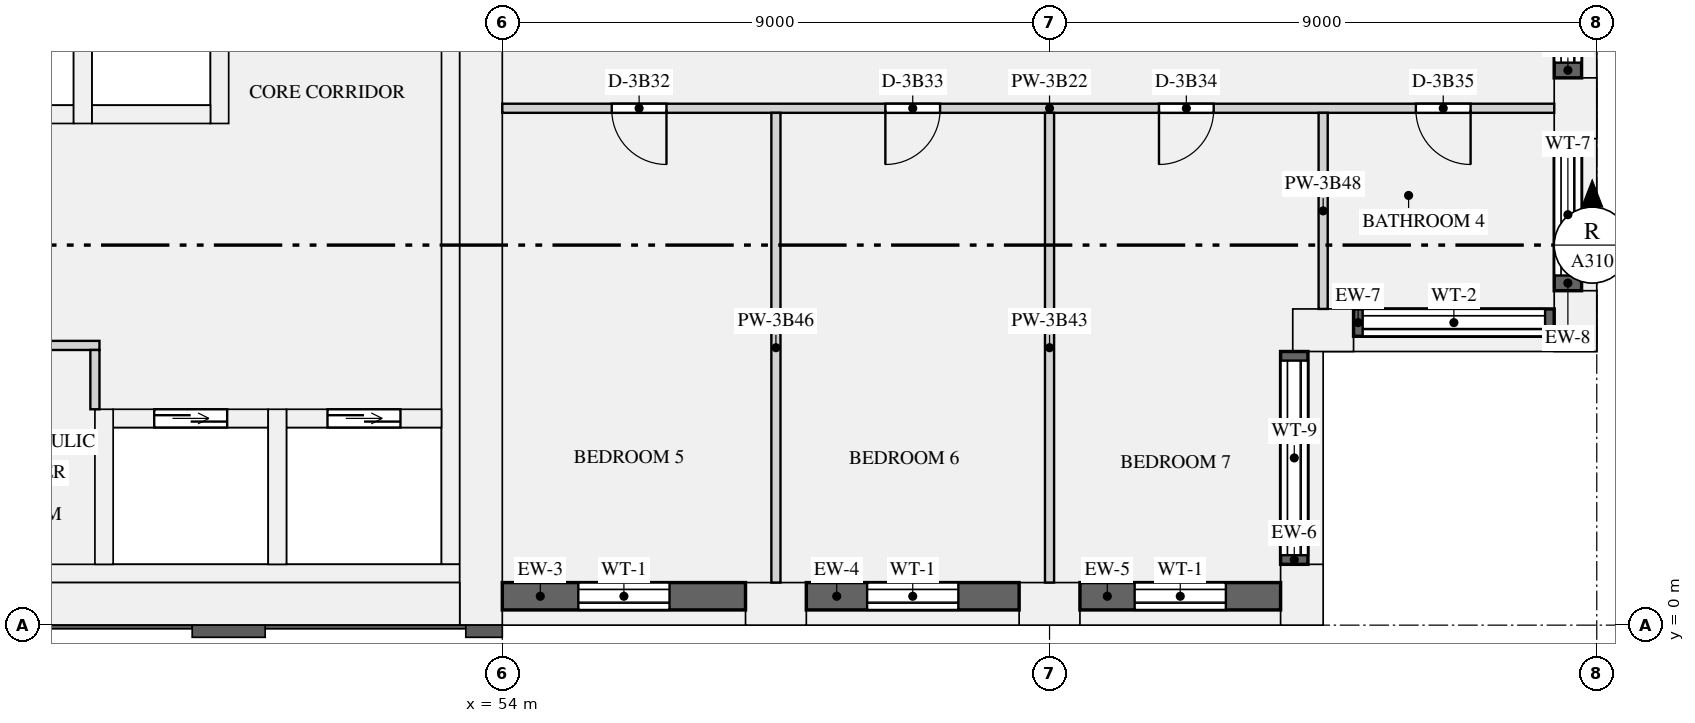
"""IFC4 building model, lengths in metres.
Left out: names, types, materials, properties, quantities, classifications, styles, units other than length and angle.
Written with IfcOpenShell. Run it as: python <this file> out.ifc"""

import sys

from ifc_helpers import new_model, si_unit, direction, frame, frame_2d, origin, origin_2d, place, context, subcontext, project, spatial, rectangle, extrude, element, fill, save


model = new_model("IFC4")
c1 = context("Model", 3, precision=1e-05, world=origin(), true_north=direction((0.0, 1.0)))
c2 = subcontext(c1, "Body", "Model", "MODEL_VIEW")
j1 = project(units=[si_unit("LENGTHUNIT", "METRE"), si_unit("PLANEANGLEUNIT", "RADIAN")], contexts=[c1])
p1 = place(None, origin())
s1 = spatial("IfcSite", under=j1, at=p1, CompositionType="ELEMENT")
p2 = place(p1, origin())
s2 = spatial("IfcBuilding", under=s1, at=p2, CompositionType="ELEMENT")
p3 = place(p2, frame((0.0, 0.0, 150.75)))
s3 = spatial("IfcBuildingStorey", under=s2, at=p3, CompositionType="ELEMENT", Elevation=150.75)
for number, where, z_axis, x_axis in (
    (1, (58.5, 0.35, 0.0), (0.0, 0.0, 1.0), (1.0, 0.0, 0.0)),
    (2, (63.0, 0.35, 0.0), (0.0, 0.0, 1.0), (1.0, 0.0, 0.0)),
    (3, (67.15, 0.5, 0.0), (0.0, 0.0, 1.0), (0.0, 1.0, 0.0)),
    (4, (67.5, 4.85, 0.0), (0.0, 0.0, 1.0), (1.0, 0.0, 0.0)),
    (5, (71.65, 5.0, 0.0), (0.0, 0.0, 1.0), (0.0, 1.0, 0.0)),
    (6, (71.65, 8.5, 0.0), (0.0, 0.0, 1.0), (0.0, 1.0, 0.0)),
):
    element("IfcColumn", number, at=place(p3, frame(where, z_axis=z_axis, x_axis=x_axis)), inside=s3, PredefinedType="USERDEFINED", context=c2, shape_type="SweptSolid", body=[
        extrude(rectangle(XDim=1.0, YDim=0.7, at=origin_2d()), origin(), (0.0, 0.0, 1.0), 3.15),
    ])
p4 = place(p3, frame((53.65, 0.0, 0.0), z_axis=(0.0, 0.0, 1.0), x_axis=(0.0, 1.0, 0.0)))
e7 = element("IfcWall", 7, at=p4, inside=s3, PredefinedType="SHEAR", context=c2, shape_type="SweptSolid", body=[
    extrude(rectangle(XDim=12.5, YDim=0.7, at=frame_2d((6.25, 0.0))), origin(), (0.0, 0.0, 1.0), 3.15),
])
p5 = place(p3, frame((18.7, 0.35, 0.0), z_axis=(0.0, 0.0, 1.0), x_axis=(1.0, 0.0, 0.0)))
e8 = element("IfcWall", 8, at=p5, inside=s3, PredefinedType="SHEAR", context=c2, shape_type="SweptSolid", body=[
    extrude(rectangle(XDim=34.6, YDim=0.7, at=frame_2d((17.3, 0.0))), origin(), (0.0, 0.0, 1.0), 3.15),
])
p6 = place(p3, frame((53.15, 1.0, 0.0), z_axis=(0.0, 0.0, 1.0), x_axis=(0.0, 1.0, 0.0)))
e9 = element("IfcWall", 9, at=p6, inside=s3, PredefinedType="SHEAR", context=c2, shape_type="SweptSolid", body=[
    extrude(rectangle(XDim=10.9, YDim=0.3, at=frame_2d((5.45, 0.0))), origin(), (0.0, 0.0, 1.0), 3.15),
])
p7 = place(p3, frame((18.7, 0.85, 0.0), z_axis=(0.0, 0.0, 1.0), x_axis=(1.0, 0.0, 0.0)))
e10 = element("IfcWall", 10, at=p7, inside=s3, PredefinedType="SHEAR", context=c2, shape_type="SweptSolid", body=[
    extrude(rectangle(XDim=34.6, YDim=0.3, at=frame_2d((17.3, 0.0))), origin(), (0.0, 0.0, 1.0), 3.15),
])
for number, where, z_axis, x_axis in (
    (11, (45.0, 8.4, 0.0), (0.0, 0.0, 1.0), (1.0, 0.0, 0.0)),
    (12, (47.25, 8.4, 0.0), (0.0, 0.0, 1.0), (1.0, 0.0, 0.0)),
):
    element("IfcWall", number, at=place(p3, frame(where, z_axis=z_axis, x_axis=x_axis)), inside=s3, PredefinedType="SHEAR", context=c2, shape_type="SweptSolid", body=[
        extrude(rectangle(XDim=1.95, YDim=0.3, at=frame_2d((0.975, 0.0))), origin(), (0.0, 0.0, 1.0), 3.15),
    ])
for number, where, z_axis, x_axis in (
    (13, (47.1, 8.25, 0.0), (0.0, 0.0, 1.0), (0.0, 1.0, 0.0)),
    (14, (49.35, 8.25, 0.0), (0.0, 0.0, 1.0), (0.0, 1.0, 0.0)),
):
    element("IfcWall", number, at=place(p3, frame(where, z_axis=z_axis, x_axis=x_axis)), inside=s3, PredefinedType="SHEAR", context=c2, shape_type="SweptSolid", body=[
        extrude(rectangle(XDim=3.65, YDim=0.3, at=frame_2d((1.825, 0.0))), origin(), (0.0, 0.0, 1.0), 3.15),
    ])
p8 = place(p3, frame((47.6, 3.4, 0.0), z_axis=(0.0, 0.0, 1.0), x_axis=(1.0, 0.0, 0.0)))
e15 = element("IfcWall", 15, at=p8, inside=s3, PredefinedType="SHEAR", context=c2, shape_type="SweptSolid", body=[
    extrude(rectangle(XDim=2.55, YDim=0.3, at=frame_2d((1.275, 0.0))), origin(), (0.0, 0.0, 1.0), 3.15),
])
p9 = place(p8, frame((0.675, 0.0, 0.0)))
e16 = element("IfcOpeningElement", 16, at=p9, cuts=e15, PredefinedType="OPENING", context=c2, shape_type="SweptSolid", body=[
    extrude(rectangle(XDim=1.2, YDim=2.1, at=frame_2d((0.6, 1.05))), frame((0.0, 0.16, 0.0), z_axis=(0.0, -1.0, 0.0), x_axis=(1.0, 0.0, 0.0)), (0.0, 0.0, 1.0), 0.32),
])
p10 = place(p3, frame((47.45, 1.0, 0.0), z_axis=(0.0, 0.0, 1.0), x_axis=(0.0, 1.0, 0.0)))
e17 = element("IfcWall", 17, at=p10, inside=s3, PredefinedType="SHEAR", context=c2, shape_type="SweptSolid", body=[
    extrude(rectangle(XDim=2.55, YDim=0.3, at=frame_2d((1.275, 0.0))), origin(), (0.0, 0.0, 1.0), 3.15),
])
p11 = place(p3, frame((50.45, 3.4, 0.0), z_axis=(0.0, 0.0, 1.0), x_axis=(1.0, 0.0, 0.0)))
e18 = element("IfcWall", 18, at=p11, inside=s3, PredefinedType="SHEAR", context=c2, shape_type="SweptSolid", body=[
    extrude(rectangle(XDim=2.55, YDim=0.3, at=frame_2d((1.275, 0.0))), origin(), (0.0, 0.0, 1.0), 3.15),
])
p12 = place(p11, frame((0.675, 0.0, 0.0)))
e19 = element("IfcOpeningElement", 19, at=p12, cuts=e18, PredefinedType="OPENING", context=c2, shape_type="SweptSolid", body=[
    extrude(rectangle(XDim=1.2, YDim=2.1, at=frame_2d((0.6, 1.05))), frame((0.0, 0.16, 0.0), z_axis=(0.0, -1.0, 0.0), x_axis=(1.0, 0.0, 0.0)), (0.0, 0.0, 1.0), 0.32),
])
p13 = place(p3, frame((50.3, 1.0, 0.0), z_axis=(0.0, 0.0, 1.0), x_axis=(0.0, 1.0, 0.0)))
e20 = element("IfcWall", 20, at=p13, inside=s3, PredefinedType="SHEAR", context=c2, shape_type="SweptSolid", body=[
    extrude(rectangle(XDim=2.55, YDim=0.3, at=frame_2d((1.275, 0.0))), origin(), (0.0, 0.0, 1.0), 3.15),
])
p14 = place(p3, frame((54.0, 0.475, 0.9), z_axis=(0.0, 0.0, 1.0), x_axis=(1.0, 0.0, 0.0)))
e21 = element("IfcWall", 21, at=p14, inside=s3, PredefinedType="SOLIDWALL", context=c2, shape_type="SweptSolid", body=[
    extrude(rectangle(XDim=4.0, YDim=0.45, at=frame_2d((2.0, 0.0))), origin(), (0.0, 0.0, 1.0), 1.93),
])
p15 = place(p14, frame((1.25, 0.0, 0.15)))
e22 = element("IfcOpeningElement", 22, at=p15, cuts=e21, PredefinedType="OPENING", context=c2, shape_type="SweptSolid", body=[
    extrude(rectangle(XDim=1.5, YDim=1.5, at=frame_2d((0.75, 0.75))), frame((0.0, 0.235, 0.0), z_axis=(0.0, -1.0, 0.0), x_axis=(1.0, 0.0, 0.0)), (0.0, 0.0, 1.0), 0.47),
])
p16 = place(p3, frame((59.0, 0.475, 0.9), z_axis=(0.0, 0.0, 1.0), x_axis=(1.0, 0.0, 0.0)))
e23 = element("IfcWall", 23, at=p16, inside=s3, PredefinedType="SOLIDWALL", context=c2, shape_type="SweptSolid", body=[
    extrude(rectangle(XDim=3.5, YDim=0.45, at=frame_2d((1.75, 0.0))), origin(), (0.0, 0.0, 1.0), 1.93),
])
p17 = place(p16, frame((1.0, 0.0, 0.15)))
e24 = element("IfcOpeningElement", 24, at=p17, cuts=e23, PredefinedType="OPENING", context=c2, shape_type="SweptSolid", body=[
    extrude(rectangle(XDim=1.5, YDim=1.5, at=frame_2d((0.75, 0.75))), frame((0.0, 0.235, 0.0), z_axis=(0.0, -1.0, 0.0), x_axis=(1.0, 0.0, 0.0)), (0.0, 0.0, 1.0), 0.47),
])
p18 = place(p3, frame((63.5, 0.475, 0.9), z_axis=(0.0, 0.0, 1.0), x_axis=(1.0, 0.0, 0.0)))
e25 = element("IfcWall", 25, at=p18, inside=s3, PredefinedType="SOLIDWALL", context=c2, shape_type="SweptSolid", body=[
    extrude(rectangle(XDim=3.3, YDim=0.45, at=frame_2d((1.65, 0.0))), origin(), (0.0, 0.0, 1.0), 1.93),
])
p19 = place(p18, frame((0.9, 0.0, 0.15)))
e26 = element("IfcOpeningElement", 26, at=p19, cuts=e25, PredefinedType="OPENING", context=c2, shape_type="SweptSolid", body=[
    extrude(rectangle(XDim=1.5, YDim=1.5, at=frame_2d((0.75, 0.75))), frame((0.0, 0.235, 0.0), z_axis=(0.0, -1.0, 0.0), x_axis=(1.0, 0.0, 0.0)), (0.0, 0.0, 1.0), 0.47),
])
p20 = place(p3, frame((67.025, 1.0, 0.9), z_axis=(0.0, 0.0, 1.0), x_axis=(0.0, 1.0, 0.0)))
e27 = element("IfcWall", 27, at=p20, inside=s3, PredefinedType="SOLIDWALL", context=c2, shape_type="SweptSolid", body=[
    extrude(rectangle(XDim=3.5, YDim=0.45, at=frame_2d((1.75, 0.0))), origin(), (0.0, 0.0, 1.0), 1.93),
])
p21 = place(p20, frame((0.15, 0.0, 0.15)))
e28 = element("IfcOpeningElement", 28, at=p21, cuts=e27, PredefinedType="OPENING", context=c2, shape_type="SweptSolid", body=[
    extrude(rectangle(XDim=3.2, YDim=1.5, at=frame_2d((1.6, 0.75))), frame((0.0, 0.235, 0.0), z_axis=(0.0, -1.0, 0.0), x_axis=(1.0, 0.0, 0.0)), (0.0, 0.0, 1.0), 0.47),
])
p22 = place(p3, frame((68.0, 4.975, 0.9), z_axis=(0.0, 0.0, 1.0), x_axis=(1.0, 0.0, 0.0)))
e29 = element("IfcWall", 29, at=p22, inside=s3, PredefinedType="SOLIDWALL", context=c2, shape_type="SweptSolid", body=[
    extrude(rectangle(XDim=3.3, YDim=0.45, at=frame_2d((1.65, 0.0))), origin(), (0.0, 0.0, 1.0), 1.93),
])
p23 = place(p22, frame((0.15, 0.0, 0.15)))
e30 = element("IfcOpeningElement", 30, at=p23, cuts=e29, PredefinedType="OPENING", context=c2, shape_type="SweptSolid", body=[
    extrude(rectangle(XDim=3.0, YDim=1.5, at=frame_2d((1.5, 0.75))), frame((0.0, 0.235, 0.0), z_axis=(0.0, -1.0, 0.0), x_axis=(1.0, 0.0, 0.0)), (0.0, 0.0, 1.0), 0.47),
])
p24 = place(p3, frame((71.525, 5.5, 0.9), z_axis=(0.0, 0.0, 1.0), x_axis=(0.0, 1.0, 0.0)))
e31 = element("IfcWall", 31, at=p24, inside=s3, PredefinedType="SOLIDWALL", context=c2, shape_type="SweptSolid", body=[
    extrude(rectangle(XDim=2.5, YDim=0.45, at=frame_2d((1.25, 0.0))), origin(), (0.0, 0.0, 1.0), 1.93),
])
p25 = place(p24, frame((0.25, 0.0, 0.15)))
e32 = element("IfcOpeningElement", 32, at=p25, cuts=e31, PredefinedType="OPENING", context=c2, shape_type="SweptSolid", body=[
    extrude(rectangle(XDim=2.0, YDim=1.5, at=frame_2d((1.0, 0.75))), frame((0.0, 0.235, 0.0), z_axis=(0.0, -1.0, 0.0), x_axis=(1.0, 0.0, 0.0)), (0.0, 0.0, 1.0), 0.47),
])
p26 = place(p3, frame((71.525, 9.0, 0.9), z_axis=(0.0, 0.0, 1.0), x_axis=(0.0, 1.0, 0.0)))
e33 = element("IfcWall", 33, at=p26, inside=s3, PredefinedType="SOLIDWALL", context=c2, shape_type="SweptSolid", body=[
    extrude(rectangle(XDim=3.0, YDim=0.45, at=frame_2d((1.5, 0.0))), origin(), (0.0, 0.0, 1.0), 1.93),
])
p27 = place(p26, frame((0.25, 0.0, 0.15)))
e34 = element("IfcOpeningElement", 34, at=p27, cuts=e33, PredefinedType="OPENING", context=c2, shape_type="SweptSolid", body=[
    extrude(rectangle(XDim=2.5, YDim=1.5, at=frame_2d((1.25, 0.75))), frame((0.0, 0.235, 0.0), z_axis=(0.0, -1.0, 0.0), x_axis=(1.0, 0.0, 0.0)), (0.0, 0.0, 1.0), 0.47),
])
p28 = place(p3, frame((44.7, 4.6, 0.0), z_axis=(0.0, 0.0, 1.0), x_axis=(1.0, 0.0, 0.0)))
e35 = element("IfcWall", 35, at=p28, inside=s3, PredefinedType="PARTITIONING", context=c2, shape_type="SweptSolid", body=[
    extrude(rectangle(XDim=2.675, YDim=0.15, at=frame_2d((1.337, 0.0))), origin(), (0.0, 0.0, 1.0), 2.83),
])
p29 = place(p28, frame((0.35, 0.0, 0.0)))
e36 = element("IfcOpeningElement", 36, at=p29, cuts=e35, PredefinedType="OPENING", context=c2, shape_type="SweptSolid", body=[
    extrude(rectangle(XDim=0.9, YDim=2.1, at=frame_2d((0.45, 1.05))), frame((0.0, 0.085, 0.0), z_axis=(0.0, -1.0, 0.0), x_axis=(1.0, 0.0, 0.0)), (0.0, 0.0, 1.0), 0.17),
])
p30 = place(p3, frame((47.3, 3.55, 0.0), z_axis=(0.0, 0.0, 1.0), x_axis=(0.0, 1.0, 0.0)))
e37 = element("IfcWall", 37, at=p30, inside=s3, PredefinedType="PARTITIONING", context=c2, shape_type="SweptSolid", body=[
    extrude(rectangle(XDim=0.975, YDim=0.15, at=frame_2d((0.487, 0.0))), origin(), (0.0, 0.0, 1.0), 2.83),
])
p31 = place(p3, frame((54.0, 8.5, 0.0), z_axis=(0.0, 0.0, 1.0), x_axis=(1.0, 0.0, 0.0)))
e38 = element("IfcWall", 38, at=p31, inside=s3, PredefinedType="PARTITIONING", context=c2, shape_type="SweptSolid", body=[
    extrude(rectangle(XDim=17.3, YDim=0.15, at=frame_2d((8.65, 0.0))), origin(), (0.0, 0.0, 1.0), 2.83),
])
p32 = place(p31, frame((1.8, 0.0, 0.0)))
e39 = element("IfcOpeningElement", 39, at=p32, cuts=e38, PredefinedType="OPENING", context=c2, shape_type="SweptSolid", body=[
    extrude(rectangle(XDim=0.9, YDim=2.1, at=frame_2d((0.45, 1.05))), frame((0.0, 0.085, 0.0), z_axis=(0.0, -1.0, 0.0), x_axis=(1.0, 0.0, 0.0)), (0.0, 0.0, 1.0), 0.17),
])
p33 = place(p31, frame((6.3, 0.0, 0.0)))
e40 = element("IfcOpeningElement", 40, at=p33, cuts=e38, PredefinedType="OPENING", context=c2, shape_type="SweptSolid", body=[
    extrude(rectangle(XDim=0.9, YDim=2.1, at=frame_2d((0.45, 1.05))), frame((0.0, 0.085, 0.0), z_axis=(0.0, -1.0, 0.0), x_axis=(1.0, 0.0, 0.0)), (0.0, 0.0, 1.0), 0.17),
])
p34 = place(p31, frame((10.8, 0.0, 0.0)))
e41 = element("IfcOpeningElement", 41, at=p34, cuts=e38, PredefinedType="OPENING", context=c2, shape_type="SweptSolid", body=[
    extrude(rectangle(XDim=0.9, YDim=2.1, at=frame_2d((0.45, 1.05))), frame((0.0, 0.085, 0.0), z_axis=(0.0, -1.0, 0.0), x_axis=(1.0, 0.0, 0.0)), (0.0, 0.0, 1.0), 0.17),
])
p35 = place(p31, frame((15.025, 0.0, 0.0)))
e42 = element("IfcOpeningElement", 42, at=p35, cuts=e38, PredefinedType="OPENING", context=c2, shape_type="SweptSolid", body=[
    extrude(rectangle(XDim=0.9, YDim=2.1, at=frame_2d((0.45, 1.05))), frame((0.0, 0.085, 0.0), z_axis=(0.0, -1.0, 0.0), x_axis=(1.0, 0.0, 0.0)), (0.0, 0.0, 1.0), 0.17),
])
for number, where, z_axis, x_axis in (
    (43, (63.0, 0.7, 0.0), (0.0, 0.0, 1.0), (0.0, 1.0, 0.0)),
    (44, (58.5, 0.7, 0.0), (0.0, 0.0, 1.0), (0.0, 1.0, 0.0)),
):
    element("IfcWall", number, at=place(p3, frame(where, z_axis=z_axis, x_axis=x_axis)), inside=s3, PredefinedType="PARTITIONING", context=c2, shape_type="SweptSolid", body=[
        extrude(rectangle(XDim=7.725, YDim=0.15, at=frame_2d((3.863, 0.0))), origin(), (0.0, 0.0, 1.0), 2.83),
    ])
p36 = place(p3, frame((67.5, 5.2, 0.0), z_axis=(0.0, 0.0, 1.0), x_axis=(0.0, 1.0, 0.0)))
e45 = element("IfcWall", 45, at=p36, inside=s3, PredefinedType="PARTITIONING", context=c2, shape_type="SweptSolid", body=[
    extrude(rectangle(XDim=3.225, YDim=0.15, at=frame_2d((1.613, 0.0))), origin(), (0.0, 0.0, 1.0), 2.83),
])
p37 = place(p15, origin())
e46 = element("IfcWindow", 46, at=p37, inside=s3, PartitioningType="SINGLE_PANEL", PredefinedType="WINDOW", context=c2, shape_type="SweptSolid", body=[
    extrude(rectangle(XDim=1.5, YDim=1.5, at=frame_2d((0.75, 0.75))), frame((0.0, -0.065, 0.0), z_axis=(0.0, -1.0, 0.0), x_axis=(1.0, 0.0, 0.0)), (0.0, 0.0, 1.0), 0.06),
])
fill(e22, e46)
p38 = place(p17, origin())
e47 = element("IfcWindow", 47, at=p38, inside=s3, PartitioningType="SINGLE_PANEL", PredefinedType="WINDOW", context=c2, shape_type="SweptSolid", body=[
    extrude(rectangle(XDim=1.5, YDim=1.5, at=frame_2d((0.75, 0.75))), frame((0.0, -0.065, 0.0), z_axis=(0.0, -1.0, 0.0), x_axis=(1.0, 0.0, 0.0)), (0.0, 0.0, 1.0), 0.06),
])
fill(e24, e47)
p39 = place(p19, origin())
e48 = element("IfcWindow", 48, at=p39, inside=s3, PartitioningType="SINGLE_PANEL", PredefinedType="WINDOW", context=c2, shape_type="SweptSolid", body=[
    extrude(rectangle(XDim=1.5, YDim=1.5, at=frame_2d((0.75, 0.75))), frame((0.0, -0.065, 0.0), z_axis=(0.0, -1.0, 0.0), x_axis=(1.0, 0.0, 0.0)), (0.0, 0.0, 1.0), 0.06),
])
fill(e26, e48)
p40 = place(p21, origin())
e49 = element("IfcWindow", 49, at=p40, inside=s3, PartitioningType="SINGLE_PANEL", PredefinedType="WINDOW", context=c2, shape_type="SweptSolid", body=[
    extrude(rectangle(XDim=3.2, YDim=1.5, at=frame_2d((1.6, 0.75))), frame((0.0, -0.065, 0.0), z_axis=(0.0, -1.0, 0.0), x_axis=(1.0, 0.0, 0.0)), (0.0, 0.0, 1.0), 0.06),
])
fill(e28, e49)
p41 = place(p23, origin())
e50 = element("IfcWindow", 50, at=p41, inside=s3, PartitioningType="SINGLE_PANEL", PredefinedType="WINDOW", context=c2, shape_type="SweptSolid", body=[
    extrude(rectangle(XDim=3.0, YDim=1.5, at=frame_2d((1.5, 0.75))), frame((0.0, -0.065, 0.0), z_axis=(0.0, -1.0, 0.0), x_axis=(1.0, 0.0, 0.0)), (0.0, 0.0, 1.0), 0.06),
])
fill(e30, e50)
p42 = place(p25, origin())
e51 = element("IfcWindow", 51, at=p42, inside=s3, PartitioningType="SINGLE_PANEL", PredefinedType="WINDOW", context=c2, shape_type="SweptSolid", body=[
    extrude(rectangle(XDim=2.0, YDim=1.5, at=frame_2d((1.0, 0.75))), frame((0.0, -0.065, 0.0), z_axis=(0.0, -1.0, 0.0), x_axis=(1.0, 0.0, 0.0)), (0.0, 0.0, 1.0), 0.06),
])
fill(e32, e51)
p43 = place(p27, origin())
e52 = element("IfcWindow", 52, at=p43, inside=s3, PartitioningType="SINGLE_PANEL", PredefinedType="WINDOW", context=c2, shape_type="SweptSolid", body=[
    extrude(rectangle(XDim=2.5, YDim=1.5, at=frame_2d((1.25, 0.75))), frame((0.0, -0.065, 0.0), z_axis=(0.0, -1.0, 0.0), x_axis=(1.0, 0.0, 0.0)), (0.0, 0.0, 1.0), 0.06),
])
fill(e34, e52)
p44 = place(p9, origin())
e53 = element("IfcDoor", 53, at=p44, inside=s3, OperationType="DOUBLE_DOOR_SLIDING", PredefinedType="DOOR", context=c2, shape_type="SweptSolid", body=[
    extrude(rectangle(XDim=1.2, YDim=2.1, at=frame_2d((0.6, 1.05))), frame((0.0, 0.025, 0.0), z_axis=(0.0, -1.0, 0.0), x_axis=(1.0, 0.0, 0.0)), (0.0, 0.0, 1.0), 0.05),
])
fill(e16, e53)
p45 = place(p12, origin())
e54 = element("IfcDoor", 54, at=p45, inside=s3, OperationType="DOUBLE_DOOR_SLIDING", PredefinedType="DOOR", context=c2, shape_type="SweptSolid", body=[
    extrude(rectangle(XDim=1.2, YDim=2.1, at=frame_2d((0.6, 1.05))), frame((0.0, 0.025, 0.0), z_axis=(0.0, -1.0, 0.0), x_axis=(1.0, 0.0, 0.0)), (0.0, 0.0, 1.0), 0.05),
])
fill(e19, e54)
p46 = place(p32, frame((0.9, 0.0, 0.0), z_axis=(0.0, 0.0, 1.0), x_axis=(-1.0, 0.0, 0.0)))
e55 = element("IfcDoor", 55, at=p46, inside=s3, OperationType="SINGLE_SWING_LEFT", PredefinedType="DOOR", context=c2, shape_type="SweptSolid", body=[
    extrude(rectangle(XDim=0.9, YDim=2.1, at=frame_2d((0.45, 1.05))), frame((0.0, 0.025, 0.0), z_axis=(0.0, -1.0, 0.0), x_axis=(1.0, 0.0, 0.0)), (0.0, 0.0, 1.0), 0.05),
])
fill(e39, e55)
p47 = place(p33, frame((0.9, 0.0, 0.0), z_axis=(0.0, 0.0, 1.0), x_axis=(-1.0, 0.0, 0.0)))
e56 = element("IfcDoor", 56, at=p47, inside=s3, OperationType="SINGLE_SWING_RIGHT", PredefinedType="DOOR", context=c2, shape_type="SweptSolid", body=[
    extrude(rectangle(XDim=0.9, YDim=2.1, at=frame_2d((0.45, 1.05))), frame((0.0, 0.025, 0.0), z_axis=(0.0, -1.0, 0.0), x_axis=(1.0, 0.0, 0.0)), (0.0, 0.0, 1.0), 0.05),
])
fill(e40, e56)
p48 = place(p34, frame((0.9, 0.0, 0.0), z_axis=(0.0, 0.0, 1.0), x_axis=(-1.0, 0.0, 0.0)))
e57 = element("IfcDoor", 57, at=p48, inside=s3, OperationType="SINGLE_SWING_RIGHT", PredefinedType="DOOR", context=c2, shape_type="SweptSolid", body=[
    extrude(rectangle(XDim=0.9, YDim=2.1, at=frame_2d((0.45, 1.05))), frame((0.0, 0.025, 0.0), z_axis=(0.0, -1.0, 0.0), x_axis=(1.0, 0.0, 0.0)), (0.0, 0.0, 1.0), 0.05),
])
fill(e41, e57)
p49 = place(p35, frame((0.9, 0.0, 0.0), z_axis=(0.0, 0.0, 1.0), x_axis=(-1.0, 0.0, 0.0)))
e58 = element("IfcDoor", 58, at=p49, inside=s3, OperationType="SINGLE_SWING_LEFT", PredefinedType="DOOR", context=c2, shape_type="SweptSolid", body=[
    extrude(rectangle(XDim=0.9, YDim=2.1, at=frame_2d((0.45, 1.05))), frame((0.0, 0.025, 0.0), z_axis=(0.0, -1.0, 0.0), x_axis=(1.0, 0.0, 0.0)), (0.0, 0.0, 1.0), 0.05),
])
fill(e42, e58)
save(model, sys.argv[1])
